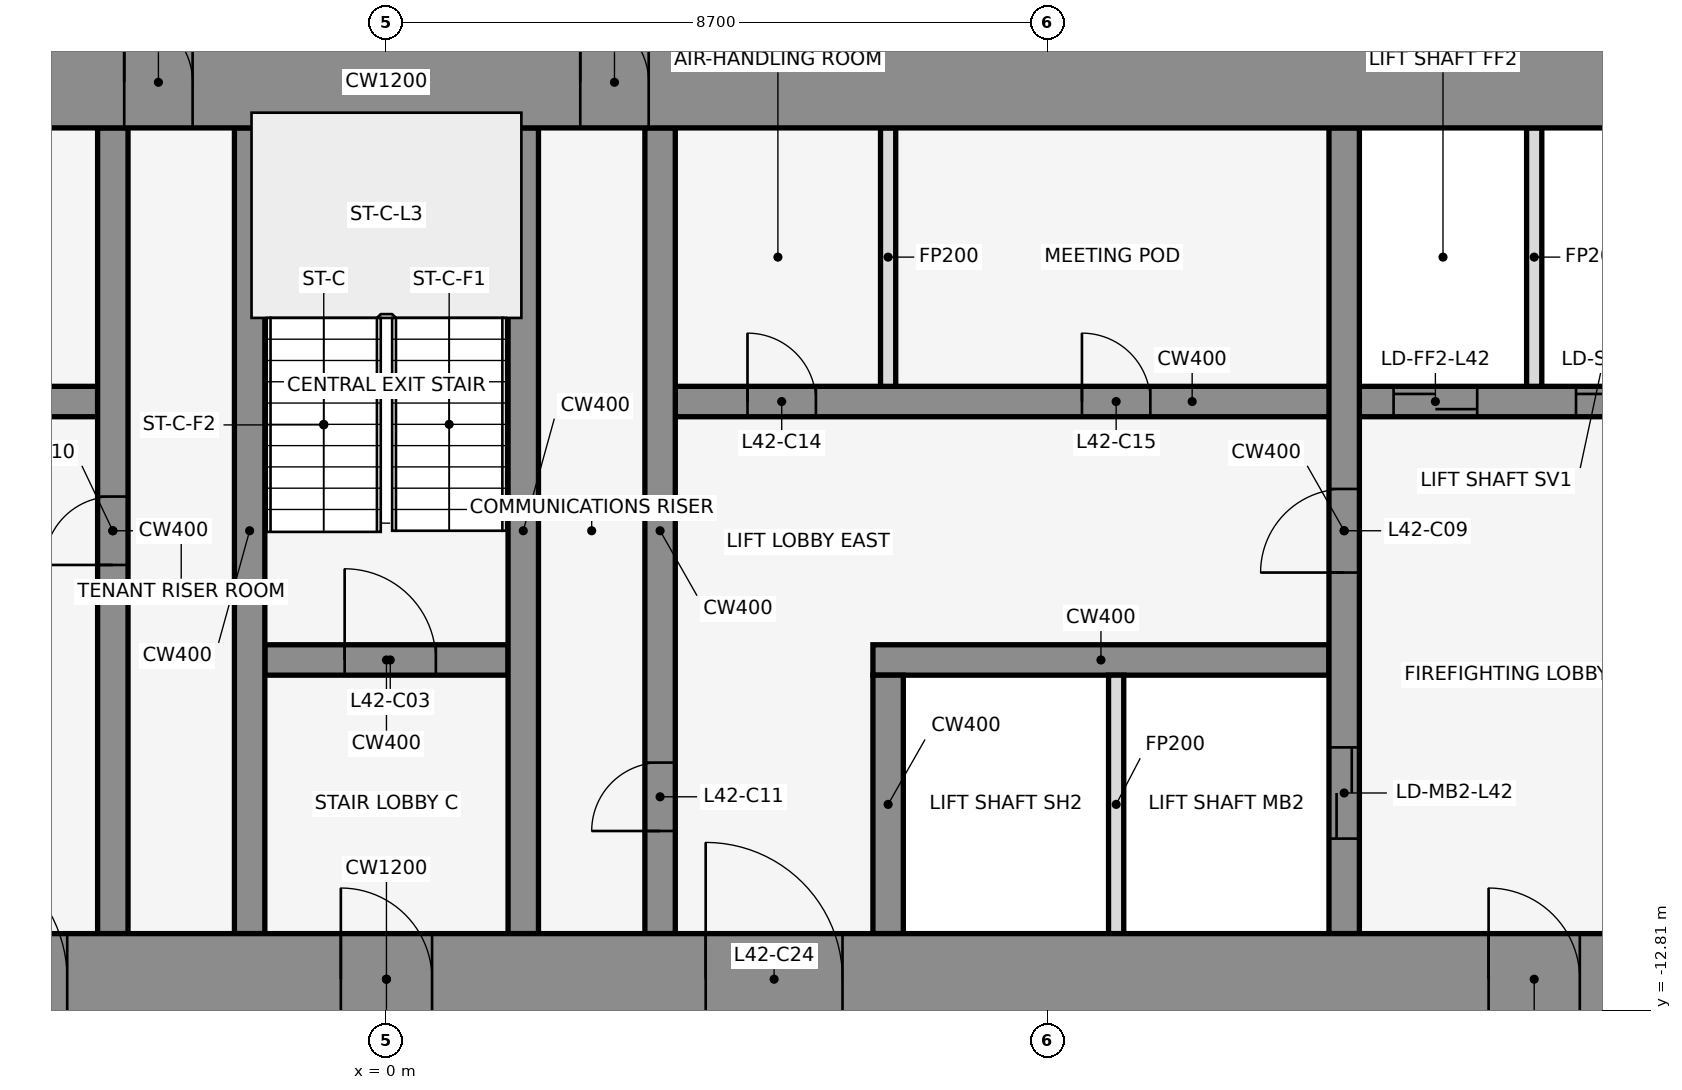
"""IFC4 building model, lengths in metres.
Left out: names, types, materials, properties, quantities, classifications, styles, units other than length and angle.
Written with IfcOpenShell. Run it as: python <this file> out.ifc"""

import sys

from ifc_helpers import new_model, si_unit, direction, frame, frame_2d, origin, place, context, subcontext, project, spatial, rectangle, extrude, element, fill, save


model = new_model("IFC4")
c1 = context("Model", 3, precision=1e-05, world=origin(), true_north=direction((0.0, 1.0)))
c2 = subcontext(c1, "Body", "Model", "MODEL_VIEW")
j1 = project(units=[si_unit("LENGTHUNIT", "METRE"), si_unit("PLANEANGLEUNIT", "RADIAN")], contexts=[c1])
p1 = place(None, origin())
s1 = spatial("IfcSite", under=j1, at=p1, CompositionType="ELEMENT")
p2 = place(p1, origin())
s2 = spatial("IfcBuilding", under=s1, at=p2, CompositionType="ELEMENT")
p3 = place(p2, frame((0.0, 0.0, 190.9)))
s3 = spatial("IfcBuildingStorey", under=s2, at=p3, CompositionType="ELEMENT", Elevation=190.9)
for number, where, z_axis, x_axis in (
    (1, (16.432, -0.105, 0.0), (0.0, 0.0, 1.0), (-0.84, 0.543, 0.0)),
    (2, (1.901, 1.08, 0.0), (0.0, 0.0, 1.0), (-0.84, -0.543, 0.0)),
    (3, (-0.068, -0.105, 0.0), (0.0, 0.0, 1.0), (-0.84, 0.543, 0.0)),
):
    element("IfcWall", number, at=place(p3, frame(where, z_axis=z_axis, x_axis=x_axis)), inside=s3, PredefinedType="STANDARD", context=c2, shape_type="SweptSolid", body=[
        extrude(rectangle(XDim=2.183, YDim=0.25, at=frame_2d((1.091, 0.0))), origin(), (0.0, 0.0, 1.0), 3.95),
    ])
p4 = place(p3, frame((-1.6, -8.2, 0.0), z_axis=(0.0, 0.0, 1.0), x_axis=(1.0, 0.0, 0.0)))
e4 = element("IfcWall", 4, at=p4, inside=s3, PredefinedType="SHEAR", context=c2, shape_type="SweptSolid", body=[
    extrude(rectangle(XDim=3.2, YDim=0.4, at=frame_2d((1.6, 0.0))), origin(), (0.0, 0.0, 1.0), 4.1),
])
p5 = place(p4, frame((1.05, 0.0, 0.0)))
e5 = element("IfcOpeningElement", 5, at=p5, cuts=e4, PredefinedType="OPENING", context=c2, shape_type="SweptSolid", body=[
    extrude(rectangle(XDim=1.2, YDim=2.1, at=frame_2d((0.6, 1.05))), frame((0.0, 0.212, 0.0), z_axis=(0.0, -1.0, 0.0), x_axis=(1.0, 0.0, 0.0)), (0.0, 0.0, 1.0), 0.424),
])
p6 = place(p3, frame((6.4, -8.2, 0.0), z_axis=(0.0, 0.0, 1.0), x_axis=(1.0, 0.0, 0.0)))
e6 = element("IfcWall", 6, at=p6, inside=s3, PredefinedType="SHEAR", context=c2, shape_type="SweptSolid", body=[
    extrude(rectangle(XDim=6.0, YDim=0.4, at=frame_2d((3.0, 0.0))), origin(), (0.0, 0.0, 1.0), 4.1),
])
p7 = place(p3, frame((-17.4, -4.8, 0.0), z_axis=(0.0, 0.0, 1.0), x_axis=(1.0, 0.0, 0.0)))
e7 = element("IfcWall", 7, at=p7, inside=s3, PredefinedType="SHEAR", context=c2, shape_type="SweptSolid", body=[
    extrude(rectangle(XDim=13.6, YDim=0.4, at=frame_2d((6.8, 0.0))), origin(), (0.0, 0.0, 1.0), 4.1),
])
p8 = place(p7, frame((0.65, 0.0, 0.0)))
e8 = element("IfcOpeningElement", 8, at=p8, cuts=e7, PredefinedType="OPENING", context=c2, shape_type="SweptSolid", body=[
    extrude(rectangle(XDim=1.1, YDim=2.1, at=frame_2d((0.55, 1.05))), frame((0.0, 0.212, 0.0), z_axis=(0.0, -1.0, 0.0), x_axis=(1.0, 0.0, 0.0)), (0.0, 0.0, 1.0), 0.424),
])
p9 = place(p7, frame((2.95, 0.0, 0.0)))
e9 = element("IfcOpeningElement", 9, at=p9, cuts=e7, PredefinedType="OPENING", context=c2, shape_type="SweptSolid", body=[
    extrude(rectangle(XDim=1.1, YDim=2.1, at=frame_2d((0.55, 1.05))), frame((0.0, 0.212, 0.0), z_axis=(0.0, -1.0, 0.0), x_axis=(1.0, 0.0, 0.0)), (0.0, 0.0, 1.0), 0.424),
])
p10 = place(p7, frame((5.85, 0.0, 0.0)))
e10 = element("IfcOpeningElement", 10, at=p10, cuts=e7, PredefinedType="OPENING", context=c2, shape_type="SweptSolid", body=[
    extrude(rectangle(XDim=0.9, YDim=2.1, at=frame_2d((0.45, 1.05))), frame((0.0, 0.212, 0.0), z_axis=(0.0, -1.0, 0.0), x_axis=(1.0, 0.0, 0.0)), (0.0, 0.0, 1.0), 0.424),
])
p11 = place(p7, frame((10.25, 0.0, 0.0)))
e11 = element("IfcOpeningElement", 11, at=p11, cuts=e7, PredefinedType="OPENING", context=c2, shape_type="SweptSolid", body=[
    extrude(rectangle(XDim=0.9, YDim=2.1, at=frame_2d((0.45, 1.05))), frame((0.0, 0.212, 0.0), z_axis=(0.0, -1.0, 0.0), x_axis=(1.0, 0.0, 0.0)), (0.0, 0.0, 1.0), 0.424),
])
p12 = place(p3, frame((3.8, -4.8, 0.0), z_axis=(0.0, 0.0, 1.0), x_axis=(1.0, 0.0, 0.0)))
e12 = element("IfcWall", 12, at=p12, inside=s3, PredefinedType="SHEAR", context=c2, shape_type="SweptSolid", body=[
    extrude(rectangle(XDim=13.6, YDim=0.4, at=frame_2d((6.8, 0.0))), origin(), (0.0, 0.0, 1.0), 4.1),
])
p13 = place(p12, frame((9.45, 0.0, 0.0)))
e13 = element("IfcOpeningElement", 13, at=p13, cuts=e12, PredefinedType="OPENING", context=c2, shape_type="SweptSolid", body=[
    extrude(rectangle(XDim=1.1, YDim=2.1, at=frame_2d((0.55, 1.05))), frame((0.0, 0.212, 0.0), z_axis=(0.0, -1.0, 0.0), x_axis=(1.0, 0.0, 0.0)), (0.0, 0.0, 1.0), 0.424),
])
p14 = place(p12, frame((11.85, 0.0, 0.0)))
e14 = element("IfcOpeningElement", 14, at=p14, cuts=e12, PredefinedType="OPENING", context=c2, shape_type="SweptSolid", body=[
    extrude(rectangle(XDim=1.1, YDim=2.1, at=frame_2d((0.55, 1.05))), frame((0.0, 0.212, 0.0), z_axis=(0.0, -1.0, 0.0), x_axis=(1.0, 0.0, 0.0)), (0.0, 0.0, 1.0), 0.424),
])
p15 = place(p12, frame((0.95, 0.0, 0.0)))
e15 = element("IfcOpeningElement", 15, at=p15, cuts=e12, PredefinedType="OPENING", context=c2, shape_type="SweptSolid", body=[
    extrude(rectangle(XDim=0.9, YDim=2.1, at=frame_2d((0.45, 1.05))), frame((0.0, 0.212, 0.0), z_axis=(0.0, -1.0, 0.0), x_axis=(1.0, 0.0, 0.0)), (0.0, 0.0, 1.0), 0.424),
])
p16 = place(p12, frame((5.35, 0.0, 0.0)))
e16 = element("IfcOpeningElement", 16, at=p16, cuts=e12, PredefinedType="OPENING", context=c2, shape_type="SweptSolid", body=[
    extrude(rectangle(XDim=0.9, YDim=2.1, at=frame_2d((0.45, 1.05))), frame((0.0, 0.212, 0.0), z_axis=(0.0, -1.0, 0.0), x_axis=(1.0, 0.0, 0.0)), (0.0, 0.0, 1.0), 0.424),
])
p17 = place(p3, frame((-3.6, -11.8, 0.0), z_axis=(0.0, 0.0, 1.0), x_axis=(0.0, 1.0, 0.0)))
e17 = element("IfcWall", 17, at=p17, inside=s3, PredefinedType="SHEAR", context=c2, shape_type="SweptSolid", body=[
    extrude(rectangle(XDim=10.6, YDim=0.4, at=frame_2d((5.3, 0.0))), origin(), (0.0, 0.0, 1.0), 4.1),
])
p18 = place(p17, frame((4.85, 0.0, 0.0)))
e18 = element("IfcOpeningElement", 18, at=p18, cuts=e17, PredefinedType="OPENING", context=c2, shape_type="SweptSolid", body=[
    extrude(rectangle(XDim=0.9, YDim=2.1, at=frame_2d((0.45, 1.05))), frame((0.0, 0.212, 0.0), z_axis=(0.0, -1.0, 0.0), x_axis=(1.0, 0.0, 0.0)), (0.0, 0.0, 1.0), 0.424),
])
for number, where, z_axis, x_axis in (
    (19, (-1.8, -11.8, 0.0), (0.0, 0.0, 1.0), (0.0, 1.0, 0.0)),
    (20, (1.8, -11.8, 0.0), (0.0, 0.0, 1.0), (0.0, 1.0, 0.0)),
):
    element("IfcWall", number, at=place(p3, frame(where, z_axis=z_axis, x_axis=x_axis)), inside=s3, PredefinedType="SHEAR", context=c2, shape_type="SweptSolid", body=[
        extrude(rectangle(XDim=10.6, YDim=0.4, at=frame_2d((5.3, 0.0))), origin(), (0.0, 0.0, 1.0), 4.1),
    ])
p19 = place(p3, frame((3.6, -11.8, 0.0), z_axis=(0.0, 0.0, 1.0), x_axis=(0.0, 1.0, 0.0)))
e21 = element("IfcWall", 21, at=p19, inside=s3, PredefinedType="SHEAR", context=c2, shape_type="SweptSolid", body=[
    extrude(rectangle(XDim=10.6, YDim=0.4, at=frame_2d((5.3, 0.0))), origin(), (0.0, 0.0, 1.0), 4.1),
])
p20 = place(p19, frame((1.35, 0.0, 0.0)))
e22 = element("IfcOpeningElement", 22, at=p20, cuts=e21, PredefinedType="OPENING", context=c2, shape_type="SweptSolid", body=[
    extrude(rectangle(XDim=0.9, YDim=2.1, at=frame_2d((0.45, 1.05))), frame((0.0, 0.212, 0.0), z_axis=(0.0, -1.0, 0.0), x_axis=(1.0, 0.0, 0.0)), (0.0, 0.0, 1.0), 0.424),
])
p21 = place(p3, frame((6.6, -11.8, 0.0), z_axis=(0.0, 0.0, 1.0), x_axis=(0.0, 1.0, 0.0)))
e23 = element("IfcWall", 23, at=p21, inside=s3, PredefinedType="SHEAR", context=c2, shape_type="SweptSolid", body=[
    extrude(rectangle(XDim=3.4, YDim=0.4, at=frame_2d((1.7, 0.0))), origin(), (0.0, 0.0, 1.0), 4.1),
])
for number, where, z_axis, x_axis in (
    (24, (6.6, -4.6, 0.0), (0.0, 0.0, 1.0), (0.0, 1.0, 0.0)),
    (25, (9.6, -11.8, 0.0), (0.0, 0.0, 1.0), (0.0, 1.0, 0.0)),
):
    element("IfcWall", number, at=place(p3, frame(where, z_axis=z_axis, x_axis=x_axis)), inside=s3, PredefinedType="PARTITIONING", context=c2, shape_type="SweptSolid", body=[
        extrude(rectangle(XDim=3.4, YDim=0.2, at=frame_2d((1.7, 0.0))), origin(), (0.0, 0.0, 1.0), 2.96),
    ])
p22 = place(p3, frame((12.6, -11.8, 0.0), z_axis=(0.0, 0.0, 1.0), x_axis=(0.0, 1.0, 0.0)))
e26 = element("IfcWall", 26, at=p22, inside=s3, PredefinedType="SHEAR", context=c2, shape_type="SweptSolid", body=[
    extrude(rectangle(XDim=10.6, YDim=0.4, at=frame_2d((5.3, 0.0))), origin(), (0.0, 0.0, 1.0), 4.1),
])
p23 = place(p22, frame((1.25, 0.0, 0.0)))
e27 = element("IfcOpeningElement", 27, at=p23, cuts=e26, PredefinedType="OPENING", context=c2, shape_type="SweptSolid", body=[
    extrude(rectangle(XDim=1.2, YDim=2.1, at=frame_2d((0.6, 1.05))), frame((0.0, 0.212, 0.0), z_axis=(0.0, -1.0, 0.0), x_axis=(1.0, 0.0, 0.0)), (0.0, 0.0, 1.0), 0.424),
])
p24 = place(p22, frame((4.75, 0.0, 0.0)))
e28 = element("IfcOpeningElement", 28, at=p24, cuts=e26, PredefinedType="OPENING", context=c2, shape_type="SweptSolid", body=[
    extrude(rectangle(XDim=1.1, YDim=2.1, at=frame_2d((0.55, 1.05))), frame((0.0, 0.212, 0.0), z_axis=(0.0, -1.0, 0.0), x_axis=(1.0, 0.0, 0.0)), (0.0, 0.0, 1.0), 0.424),
])
p25 = place(p3, frame((15.1, -4.6, 0.0), z_axis=(0.0, 0.0, 1.0), x_axis=(0.0, 1.0, 0.0)))
e29 = element("IfcWall", 29, at=p25, inside=s3, PredefinedType="PARTITIONING", context=c2, shape_type="SweptSolid", body=[
    extrude(rectangle(XDim=3.4, YDim=0.2, at=frame_2d((1.7, 0.0))), origin(), (0.0, 0.0, 1.0), 2.96),
])
p26 = place(p3, frame((-22.0, -0.6, 0.0), z_axis=(0.0, 0.0, 1.0), x_axis=(1.0, 0.0, 0.0)))
e30 = element("IfcWall", 30, at=p26, inside=s3, PredefinedType="SHEAR", context=c2, shape_type="SweptSolid", body=[
    extrude(rectangle(XDim=44.0, YDim=1.2, at=frame_2d((22.0, 0.0))), origin(), (0.0, 0.0, 1.0), 4.1),
])
p27 = place(p26, frame((18.55, 0.0, 0.0)))
e31 = element("IfcOpeningElement", 31, at=p27, cuts=e30, PredefinedType="OPENING", context=c2, shape_type="SweptSolid", body=[
    extrude(rectangle(XDim=0.9, YDim=2.1, at=frame_2d((0.45, 1.05))), frame((0.0, 0.612, 0.0), z_axis=(0.0, -1.0, 0.0), x_axis=(1.0, 0.0, 0.0)), (0.0, 0.0, 1.0), 1.224),
])
p28 = place(p26, frame((24.55, 0.0, 0.0)))
e32 = element("IfcOpeningElement", 32, at=p28, cuts=e30, PredefinedType="OPENING", context=c2, shape_type="SweptSolid", body=[
    extrude(rectangle(XDim=0.9, YDim=2.1, at=frame_2d((0.45, 1.05))), frame((0.0, 0.612, 0.0), z_axis=(0.0, -1.0, 0.0), x_axis=(1.0, 0.0, 0.0)), (0.0, 0.0, 1.0), 1.224),
])
p29 = place(p3, frame((-22.0, -12.4, 0.0), z_axis=(0.0, 0.0, 1.0), x_axis=(1.0, 0.0, 0.0)))
e33 = element("IfcWall", 33, at=p29, inside=s3, PredefinedType="SHEAR", context=c2, shape_type="SweptSolid", body=[
    extrude(rectangle(XDim=44.0, YDim=1.2, at=frame_2d((22.0, 0.0))), origin(), (0.0, 0.0, 1.0), 4.1),
])
p30 = place(p29, frame((2.2, 0.0, 0.0)))
e34 = element("IfcOpeningElement", 34, at=p30, cuts=e33, PredefinedType="OPENING", context=c2, shape_type="SweptSolid", body=[
    extrude(rectangle(XDim=1.2, YDim=2.1, at=frame_2d((0.6, 1.05))), frame((0.0, 0.612, 0.0), z_axis=(0.0, -1.0, 0.0), x_axis=(1.0, 0.0, 0.0)), (0.0, 0.0, 1.0), 1.224),
])
p31 = place(p29, frame((21.4, 0.0, 0.0)))
e35 = element("IfcOpeningElement", 35, at=p31, cuts=e33, PredefinedType="OPENING", context=c2, shape_type="SweptSolid", body=[
    extrude(rectangle(XDim=1.2, YDim=2.1, at=frame_2d((0.6, 1.05))), frame((0.0, 0.612, 0.0), z_axis=(0.0, -1.0, 0.0), x_axis=(1.0, 0.0, 0.0)), (0.0, 0.0, 1.0), 1.224),
])
p32 = place(p29, frame((40.6, 0.0, 0.0)))
e36 = element("IfcOpeningElement", 36, at=p32, cuts=e33, PredefinedType="OPENING", context=c2, shape_type="SweptSolid", body=[
    extrude(rectangle(XDim=1.2, YDim=2.1, at=frame_2d((0.6, 1.05))), frame((0.0, 0.612, 0.0), z_axis=(0.0, -1.0, 0.0), x_axis=(1.0, 0.0, 0.0)), (0.0, 0.0, 1.0), 1.224),
])
p33 = place(p29, frame((16.0, 0.0, 0.0)))
e37 = element("IfcOpeningElement", 37, at=p33, cuts=e33, PredefinedType="OPENING", context=c2, shape_type="SweptSolid", body=[
    extrude(rectangle(XDim=1.8, YDim=2.1, at=frame_2d((0.9, 1.05))), frame((0.0, 0.612, 0.0), z_axis=(0.0, -1.0, 0.0), x_axis=(1.0, 0.0, 0.0)), (0.0, 0.0, 1.0), 1.224),
])
p34 = place(p29, frame((6.3, 0.0, 0.0)))
e38 = element("IfcOpeningElement", 38, at=p34, cuts=e33, PredefinedType="OPENING", context=c2, shape_type="SweptSolid", body=[
    extrude(rectangle(XDim=1.2, YDim=2.1, at=frame_2d((0.6, 1.05))), frame((0.0, 0.612, 0.0), z_axis=(0.0, -1.0, 0.0), x_axis=(1.0, 0.0, 0.0)), (0.0, 0.0, 1.0), 1.224),
])
p35 = place(p29, frame((26.2, 0.0, 0.0)))
e39 = element("IfcOpeningElement", 39, at=p35, cuts=e33, PredefinedType="OPENING", context=c2, shape_type="SweptSolid", body=[
    extrude(rectangle(XDim=1.8, YDim=2.1, at=frame_2d((0.9, 1.05))), frame((0.0, 0.612, 0.0), z_axis=(0.0, -1.0, 0.0), x_axis=(1.0, 0.0, 0.0)), (0.0, 0.0, 1.0), 1.224),
])
p36 = place(p29, frame((36.5, 0.0, 0.0)))
e40 = element("IfcOpeningElement", 40, at=p36, cuts=e33, PredefinedType="OPENING", context=c2, shape_type="SweptSolid", body=[
    extrude(rectangle(XDim=1.2, YDim=2.1, at=frame_2d((0.6, 1.05))), frame((0.0, 0.612, 0.0), z_axis=(0.0, -1.0, 0.0), x_axis=(1.0, 0.0, 0.0)), (0.0, 0.0, 1.0), 1.224),
])
p37 = place(p5, origin())
e41 = element("IfcDoor", 41, at=p37, inside=s3, OperationType="SINGLE_SWING_LEFT", PredefinedType="DOOR", context=c2, shape_type="SweptSolid", body=[
    extrude(rectangle(XDim=1.2, YDim=2.1, at=frame_2d((0.6, 1.05))), frame((0.0, 0.025, 0.0), z_axis=(0.0, -1.0, 0.0), x_axis=(1.0, 0.0, 0.0)), (0.0, 0.0, 1.0), 0.05),
])
fill(e5, e41)
p38 = place(p23, origin())
e42 = element("IfcDoor", 42, at=p38, inside=s3, OperationType="DOUBLE_DOOR_SLIDING", PredefinedType="DOOR", context=c2, shape_type="SweptSolid", body=[
    extrude(rectangle(XDim=1.2, YDim=2.1, at=frame_2d((0.6, 1.05))), frame((0.0, 0.025, 0.0), z_axis=(0.0, -1.0, 0.0), x_axis=(1.0, 0.0, 0.0)), (0.0, 0.0, 1.0), 0.05),
])
fill(e27, e42)
p39 = place(p13, origin())
e43 = element("IfcDoor", 43, at=p39, inside=s3, OperationType="DOUBLE_DOOR_SLIDING", PredefinedType="DOOR", context=c2, shape_type="SweptSolid", body=[
    extrude(rectangle(XDim=1.1, YDim=2.1, at=frame_2d((0.55, 1.05))), frame((0.0, 0.025, 0.0), z_axis=(0.0, -1.0, 0.0), x_axis=(1.0, 0.0, 0.0)), (0.0, 0.0, 1.0), 0.05),
])
fill(e13, e43)
p40 = place(p14, origin())
e44 = element("IfcDoor", 44, at=p40, inside=s3, OperationType="DOUBLE_DOOR_SLIDING", PredefinedType="DOOR", context=c2, shape_type="SweptSolid", body=[
    extrude(rectangle(XDim=1.1, YDim=2.1, at=frame_2d((0.55, 1.05))), frame((0.0, 0.025, 0.0), z_axis=(0.0, -1.0, 0.0), x_axis=(1.0, 0.0, 0.0)), (0.0, 0.0, 1.0), 0.05),
])
fill(e14, e44)
p41 = place(p24, frame((1.1, 0.0, 0.0), z_axis=(0.0, 0.0, 1.0), x_axis=(-1.0, 0.0, 0.0)))
e45 = element("IfcDoor", 45, at=p41, inside=s3, OperationType="SINGLE_SWING_RIGHT", PredefinedType="DOOR", context=c2, shape_type="SweptSolid", body=[
    extrude(rectangle(XDim=1.1, YDim=2.1, at=frame_2d((0.55, 1.05))), frame((0.0, 0.025, 0.0), z_axis=(0.0, -1.0, 0.0), x_axis=(1.0, 0.0, 0.0)), (0.0, 0.0, 1.0), 0.05),
])
fill(e28, e45)
p42 = place(p18, frame((0.9, 0.0, 0.0), z_axis=(0.0, 0.0, 1.0), x_axis=(-1.0, 0.0, 0.0)))
e46 = element("IfcDoor", 46, at=p42, inside=s3, OperationType="SINGLE_SWING_LEFT", PredefinedType="DOOR", context=c2, shape_type="SweptSolid", body=[
    extrude(rectangle(XDim=0.9, YDim=2.1, at=frame_2d((0.45, 1.05))), frame((0.0, 0.025, 0.0), z_axis=(0.0, -1.0, 0.0), x_axis=(1.0, 0.0, 0.0)), (0.0, 0.0, 1.0), 0.05),
])
fill(e18, e46)
p43 = place(p20, origin())
e47 = element("IfcDoor", 47, at=p43, inside=s3, OperationType="SINGLE_SWING_LEFT", PredefinedType="DOOR", context=c2, shape_type="SweptSolid", body=[
    extrude(rectangle(XDim=0.9, YDim=2.1, at=frame_2d((0.45, 1.05))), frame((0.0, 0.025, 0.0), z_axis=(0.0, -1.0, 0.0), x_axis=(1.0, 0.0, 0.0)), (0.0, 0.0, 1.0), 0.05),
])
fill(e22, e47)
p44 = place(p15, origin())
e48 = element("IfcDoor", 48, at=p44, inside=s3, OperationType="SINGLE_SWING_RIGHT", PredefinedType="DOOR", context=c2, shape_type="SweptSolid", body=[
    extrude(rectangle(XDim=0.9, YDim=2.1, at=frame_2d((0.45, 1.05))), frame((0.0, 0.025, 0.0), z_axis=(0.0, -1.0, 0.0), x_axis=(1.0, 0.0, 0.0)), (0.0, 0.0, 1.0), 0.05),
])
fill(e15, e48)
p45 = place(p16, origin())
e49 = element("IfcDoor", 49, at=p45, inside=s3, OperationType="SINGLE_SWING_LEFT", PredefinedType="DOOR", context=c2, shape_type="SweptSolid", body=[
    extrude(rectangle(XDim=0.9, YDim=2.1, at=frame_2d((0.45, 1.05))), frame((0.0, 0.025, 0.0), z_axis=(0.0, -1.0, 0.0), x_axis=(1.0, 0.0, 0.0)), (0.0, 0.0, 1.0), 0.05),
])
fill(e16, e49)
p46 = place(p27, origin())
e50 = element("IfcDoor", 50, at=p46, inside=s3, OperationType="SINGLE_SWING_LEFT", PredefinedType="DOOR", context=c2, shape_type="SweptSolid", body=[
    extrude(rectangle(XDim=0.9, YDim=2.1, at=frame_2d((0.45, 1.05))), frame((0.0, 0.025, 0.0), z_axis=(0.0, -1.0, 0.0), x_axis=(1.0, 0.0, 0.0)), (0.0, 0.0, 1.0), 0.05),
])
fill(e31, e50)
p47 = place(p28, origin())
e51 = element("IfcDoor", 51, at=p47, inside=s3, OperationType="SINGLE_SWING_LEFT", PredefinedType="DOOR", context=c2, shape_type="SweptSolid", body=[
    extrude(rectangle(XDim=0.9, YDim=2.1, at=frame_2d((0.45, 1.05))), frame((0.0, 0.025, 0.0), z_axis=(0.0, -1.0, 0.0), x_axis=(1.0, 0.0, 0.0)), (0.0, 0.0, 1.0), 0.05),
])
fill(e32, e51)
p48 = place(p31, frame((1.2, 0.0, 0.0), z_axis=(0.0, 0.0, 1.0), x_axis=(-1.0, 0.0, 0.0)))
e52 = element("IfcDoor", 52, at=p48, inside=s3, OperationType="SINGLE_SWING_RIGHT", PredefinedType="DOOR", context=c2, shape_type="SweptSolid", body=[
    extrude(rectangle(XDim=1.2, YDim=2.1, at=frame_2d((0.6, 1.05))), frame((0.0, 0.025, 0.0), z_axis=(0.0, -1.0, 0.0), x_axis=(1.0, 0.0, 0.0)), (0.0, 0.0, 1.0), 0.05),
])
fill(e35, e52)
p49 = place(p33, origin())
e53 = element("IfcDoor", 53, at=p49, inside=s3, OperationType="SINGLE_SWING_LEFT", PredefinedType="DOOR", context=c2, shape_type="SweptSolid", body=[
    extrude(rectangle(XDim=1.8, YDim=2.1, at=frame_2d((0.9, 1.05))), frame((0.0, 0.025, 0.0), z_axis=(0.0, -1.0, 0.0), x_axis=(1.0, 0.0, 0.0)), (0.0, 0.0, 1.0), 0.05),
])
fill(e37, e53)
p50 = place(p35, origin())
e54 = element("IfcDoor", 54, at=p50, inside=s3, OperationType="SINGLE_SWING_LEFT", PredefinedType="DOOR", context=c2, shape_type="SweptSolid", body=[
    extrude(rectangle(XDim=1.8, YDim=2.1, at=frame_2d((0.9, 1.05))), frame((0.0, 0.025, 0.0), z_axis=(0.0, -1.0, 0.0), x_axis=(1.0, 0.0, 0.0)), (0.0, 0.0, 1.0), 0.05),
])
fill(e39, e54)
p51 = place(p36, frame((1.2, 0.0, 0.0), z_axis=(0.0, 0.0, 1.0), x_axis=(-1.0, 0.0, 0.0)))
e55 = element("IfcDoor", 55, at=p51, inside=s3, OperationType="SINGLE_SWING_RIGHT", PredefinedType="DOOR", context=c2, shape_type="SweptSolid", body=[
    extrude(rectangle(XDim=1.2, YDim=2.1, at=frame_2d((0.6, 1.05))), frame((0.0, 0.025, 0.0), z_axis=(0.0, -1.0, 0.0), x_axis=(1.0, 0.0, 0.0)), (0.0, 0.0, 1.0), 0.05),
])
fill(e40, e55)
save(model, sys.argv[1])
